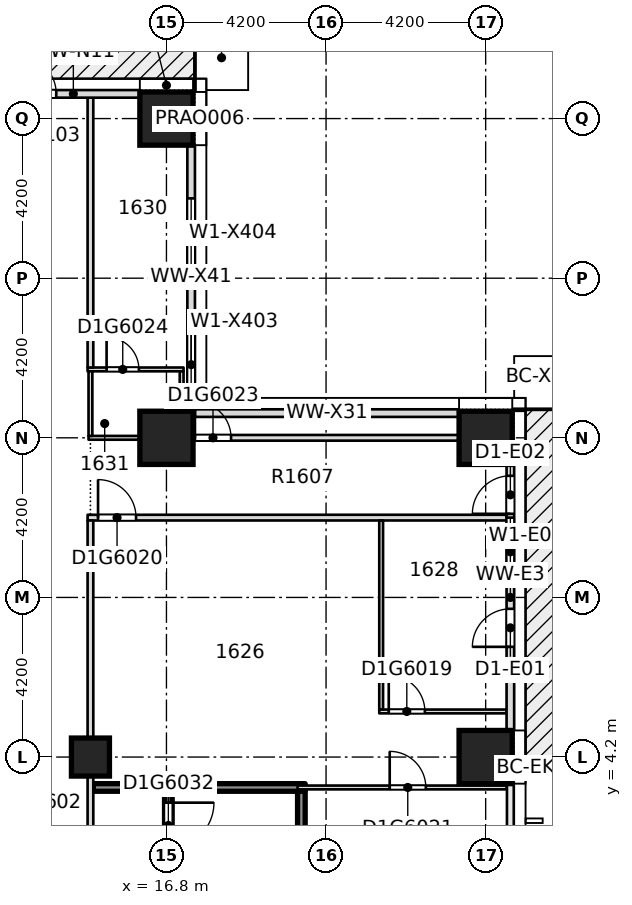
"""IFC4 building model, lengths in metres.
Left out: names, types, materials, properties, quantities, classifications, styles, units other than length and angle.
Written with IfcOpenShell. Run it as: python <this file> out.ifc"""

import sys

from ifc_helpers import new_model, si_unit, direction, frame, frame_2d, origin, origin_2d, place, context, subcontext, project, spatial, rectangle, extrude, element, fill, save


model = new_model("IFC4")
c1 = context("Model", 3, precision=1e-05, world=origin(), true_north=direction((0.0, 1.0)))
c2 = subcontext(c1, "Body", "Model", "MODEL_VIEW")
j1 = project(units=[si_unit("LENGTHUNIT", "METRE"), si_unit("PLANEANGLEUNIT", "RADIAN")], contexts=[c1])
p1 = place(None, origin())
s1 = spatial("IfcSite", under=j1, at=p1, CompositionType="ELEMENT")
p2 = place(p1, origin())
s2 = spatial("IfcBuilding", under=s1, at=p2, CompositionType="ELEMENT")
p3 = place(p2, frame((0.0, 0.0, 69.0)))
s3 = spatial("IfcBuildingStorey", under=s2, at=p3, CompositionType="ELEMENT", Elevation=69.0)
for number, where, z_axis, x_axis in (
    (1, (25.2, 4.2, -0.32), (0.0, 0.0, 1.0), (1.0, 0.0, 0.0)),
    (2, (16.8, 12.6, -0.32), (0.0, 0.0, 1.0), (1.0, 0.0, 0.0)),
    (3, (25.2, 12.6, -0.32), (0.0, 0.0, 1.0), (1.0, 0.0, 0.0)),
    (4, (16.8, 21.0, -0.32), (0.0, 0.0, 1.0), (1.0, 0.0, 0.0)),
):
    element("IfcColumn", number, at=place(p3, frame(where, z_axis=z_axis, x_axis=x_axis)), inside=s3, PredefinedType="COLUMN", context=c2, shape_type="SweptSolid", body=[
        extrude(rectangle(XDim=1.4, YDim=1.4, at=origin_2d()), origin(), (0.0, 0.0, 1.0), 3.45),
    ])
p4 = place(p3, frame((14.8, 4.2, -0.32), z_axis=(0.0, 0.0, 1.0), x_axis=(1.0, 0.0, 0.0)))
e5 = element("IfcColumn", 5, at=p4, inside=s3, PredefinedType="COLUMN", context=c2, shape_type="SweptSolid", body=[
    extrude(rectangle(XDim=1.0, YDim=1.0, at=origin_2d()), origin(), (0.0, 0.0, 1.0), 3.45),
])
p5 = place(p3, frame((14.875, 3.4, 0.0), z_axis=(0.0, 0.0, 1.0), x_axis=(1.0, 0.0, 0.0)))
e6 = element("IfcWall", 6, at=p5, inside=s3, PredefinedType="SOLIDWALL", context=c2, shape_type="SweptSolid", body=[
    extrude(rectangle(XDim=5.575, YDim=0.2, at=frame_2d((2.788, 0.0))), origin(), (0.0, 0.0, 1.0), 3.13),
])
p6 = place(p3, frame((20.25, 3.4, 0.0), z_axis=(0.0, 0.0, 1.0), x_axis=(1.0, 0.0, 0.0)))
e7 = element("IfcWall", 7, at=p6, inside=s3, PredefinedType="PARTITIONING", context=c2, shape_type="SweptSolid", body=[
    extrude(rectangle(XDim=5.5, YDim=0.1, at=frame_2d((2.75, 0.0))), origin(), (0.0, 0.0, 1.0), 3.13),
])
p7 = place(p6, frame((2.425, 0.0, 0.0)))
e8 = element("IfcOpeningElement", 8, at=p7, cuts=e7, PredefinedType="OPENING", context=c2, shape_type="SweptSolid", body=[
    extrude(rectangle(XDim=0.95, YDim=2.1, at=frame_2d((0.475, 1.05))), frame((0.0, 0.06, 0.0), z_axis=(0.0, -1.0, 0.0), x_axis=(1.0, 0.0, 0.0)), (0.0, 0.0, 1.0), 0.12),
])
p8 = place(p3, frame((22.4, 5.4, 0.0), z_axis=(0.0, 0.0, 1.0), x_axis=(1.0, 0.0, 0.0)))
e9 = element("IfcWall", 9, at=p8, inside=s3, PredefinedType="PARTITIONING", context=c2, shape_type="SweptSolid", body=[
    extrude(rectangle(XDim=3.35, YDim=0.1, at=frame_2d((1.675, 0.0))), origin(), (0.0, 0.0, 1.0), 3.13),
])
p9 = place(p8, frame((0.25, 0.0, 0.0)))
e10 = element("IfcOpeningElement", 10, at=p9, cuts=e9, PredefinedType="OPENING", context=c2, shape_type="SweptSolid", body=[
    extrude(rectangle(XDim=0.95, YDim=2.1, at=frame_2d((0.475, 1.05))), frame((0.0, 0.06, 0.0), z_axis=(0.0, -1.0, 0.0), x_axis=(1.0, 0.0, 0.0)), (0.0, 0.0, 1.0), 0.12),
])
p10 = place(p3, frame((14.725, 10.5, 0.0), z_axis=(0.0, 0.0, 1.0), x_axis=(1.0, 0.0, 0.0)))
e11 = element("IfcWall", 11, at=p10, inside=s3, PredefinedType="PARTITIONING", context=c2, shape_type="SweptSolid", body=[
    extrude(rectangle(XDim=11.025, YDim=0.15, at=frame_2d((5.512, 0.0))), origin(), (0.0, 0.0, 1.0), 3.13),
])
p11 = place(p10, frame((0.275, 0.0, 0.0)))
e12 = element("IfcOpeningElement", 12, at=p11, cuts=e11, PredefinedType="OPENING", context=c2, shape_type="SweptSolid", body=[
    extrude(rectangle(XDim=1.0, YDim=2.1, at=frame_2d((0.5, 1.05))), frame((0.0, 0.085, 0.0), z_axis=(0.0, -1.0, 0.0), x_axis=(1.0, 0.0, 0.0)), (0.0, 0.0, 1.0), 0.17),
])
p12 = place(p3, frame((14.75, 12.6, 0.0), z_axis=(0.0, 0.0, 1.0), x_axis=(1.0, 0.0, 0.0)))
e13 = element("IfcWall", 13, at=p12, inside=s3, PredefinedType="PARTITIONING", context=c2, shape_type="SweptSolid", body=[
    extrude(rectangle(XDim=2.5, YDim=0.1, at=frame_2d((1.25, 0.0))), origin(), (0.0, 0.0, 1.0), 3.13),
])
p13 = place(p3, frame((17.15, 12.6, 0.0), z_axis=(0.0, 0.0, 1.0), x_axis=(1.0, 0.0, 0.0)))
e14 = element("IfcWall", 14, at=p13, inside=s3, PredefinedType="PARTITIONING", context=c2, shape_type="SweptSolid", body=[
    extrude(rectangle(XDim=0.25, YDim=0.15, at=frame_2d((0.125, 0.0))), origin(), (0.0, 0.0, 1.0), 3.13),
])
p14 = place(p3, frame((14.725, 14.4, 0.0), z_axis=(0.0, 0.0, 1.0), x_axis=(1.0, 0.0, 0.0)))
e15 = element("IfcWall", 15, at=p14, inside=s3, PredefinedType="PARTITIONING", context=c2, shape_type="SweptSolid", body=[
    extrude(rectangle(XDim=2.525, YDim=0.1, at=frame_2d((1.262, 0.0))), origin(), (0.0, 0.0, 1.0), 3.13),
])
p15 = place(p14, frame((0.5, 0.0, 0.0)))
e16 = element("IfcOpeningElement", 16, at=p15, cuts=e15, PredefinedType="OPENING", context=c2, shape_type="SweptSolid", body=[
    extrude(rectangle(XDim=0.85, YDim=2.1, at=frame_2d((0.425, 1.05))), frame((0.0, 0.06, 0.0), z_axis=(0.0, -1.0, 0.0), x_axis=(1.0, 0.0, 0.0)), (0.0, 0.0, 1.0), 0.12),
])
p16 = place(p3, frame((14.8, -3.35, 0.0), z_axis=(0.0, 0.0, 1.0), x_axis=(0.0, 1.0, 0.0)))
e17 = element("IfcWall", 17, at=p16, inside=s3, PredefinedType="PARTITIONING", context=c2, shape_type="SweptSolid", body=[
    extrude(rectangle(XDim=13.775, YDim=0.15, at=frame_2d((6.888, 0.0))), origin(), (0.0, 0.0, 1.0), 3.13),
])
p17 = place(p16, frame((2.8, 0.0, 0.0)))
e18 = element("IfcOpeningElement", 18, at=p17, cuts=e17, PredefinedType="OPENING", context=c2, shape_type="SweptSolid", body=[
    extrude(rectangle(XDim=1.1, YDim=2.1, at=frame_2d((0.55, 1.05))), frame((0.0, 0.085, 0.0), z_axis=(0.0, -1.0, 0.0), x_axis=(1.0, 0.0, 0.0)), (0.0, 0.0, 1.0), 0.17),
])
p18 = place(p3, frame((14.8, 12.65, 0.0), z_axis=(0.0, 0.0, 1.0), x_axis=(0.0, 1.0, 0.0)))
e19 = element("IfcWall", 19, at=p18, inside=s3, PredefinedType="PARTITIONING", context=c2, shape_type="SweptSolid", body=[
    extrude(rectangle(XDim=1.7, YDim=0.1, at=frame_2d((0.85, 0.0))), origin(), (0.0, 0.0, 1.0), 3.13),
])
p19 = place(p3, frame((14.8, 14.45, 0.0), z_axis=(0.0, 0.0, 1.0), x_axis=(0.0, 1.0, 0.0)))
e20 = element("IfcWall", 20, at=p19, inside=s3, PredefinedType="PARTITIONING", context=c2, shape_type="SweptSolid", body=[
    extrude(rectangle(XDim=7.1, YDim=0.15, at=frame_2d((3.55, 0.0))), origin(), (0.0, 0.0, 1.0), 3.13),
])
p20 = place(p3, frame((16.85, -3.35, 0.0), z_axis=(0.0, 0.0, 1.0), x_axis=(0.0, 1.0, 0.0)))
e21 = element("IfcWall", 21, at=p20, inside=s3, PredefinedType="SOLIDWALL", context=c2, shape_type="SweptSolid", body=[
    extrude(rectangle(XDim=6.65, YDim=0.2, at=frame_2d((3.325, 0.0))), origin(), (0.0, 0.0, 1.0), 3.13),
])
p21 = place(p20, frame((5.15, 0.0, 0.0)))
e22 = element("IfcOpeningElement", 22, at=p21, cuts=e21, PredefinedType="OPENING", context=c2, shape_type="SweptSolid", body=[
    extrude(rectangle(XDim=1.2, YDim=2.1, at=frame_2d((0.6, 1.05))), frame((0.0, 0.11, 0.0), z_axis=(0.0, -1.0, 0.0), x_axis=(1.0, 0.0, 0.0)), (0.0, 0.0, 1.0), 0.22),
])
p22 = place(p3, frame((17.2, 12.675, 0.0), z_axis=(0.0, 0.0, 1.0), x_axis=(0.0, 1.0, 0.0)))
e23 = element("IfcWall", 23, at=p22, inside=s3, PredefinedType="PARTITIONING", context=c2, shape_type="SweptSolid", body=[
    extrude(rectangle(XDim=1.675, YDim=0.1, at=frame_2d((0.837, 0.0))), origin(), (0.0, 0.0, 1.0), 3.13),
])
p23 = place(p3, frame((20.35, -0.83, 0.0), z_axis=(0.0, 0.0, 1.0), x_axis=(0.0, 1.0, 0.0)))
e24 = element("IfcWall", 24, at=p23, inside=s3, PredefinedType="SOLIDWALL", context=c2, shape_type="SweptSolid", body=[
    extrude(rectangle(XDim=4.13, YDim=0.2, at=frame_2d((2.065, 0.0))), origin(), (0.0, 0.0, 1.0), 3.13),
])
p24 = place(p3, frame((22.45, 5.45, 0.0), z_axis=(0.0, 0.0, 1.0), x_axis=(0.0, 1.0, 0.0)))
e25 = element("IfcWall", 25, at=p24, inside=s3, PredefinedType="PARTITIONING", context=c2, shape_type="SweptSolid", body=[
    extrude(rectangle(XDim=4.975, YDim=0.1, at=frame_2d((2.488, 0.0))), origin(), (0.0, 0.0, 1.0), 3.13),
])
p25 = place(p3, frame((25.85, 4.9, 0.0), z_axis=(0.0, 0.0, 1.0), x_axis=(0.0, 1.0, 0.0)))
e26 = element("IfcWall", 26, at=p25, inside=s3, PredefinedType="STANDARD", context=c2, shape_type="SweptSolid", body=[
    extrude(rectangle(XDim=7.0, YDim=0.2, at=frame_2d((3.5, 0.0))), origin(), (0.0, 0.0, 1.0), 3.13),
])
p26 = place(p25, frame((2.2, 0.0, 0.0)))
e27 = element("IfcOpeningElement", 27, at=p26, cuts=e26, PredefinedType="OPENING", context=c2, shape_type="SweptSolid", body=[
    extrude(rectangle(XDim=1.0, YDim=2.4, at=frame_2d((0.5, 1.2))), frame((0.0, 0.11, 0.0), z_axis=(0.0, -1.0, 0.0), x_axis=(1.0, 0.0, 0.0)), (0.0, 0.0, 1.0), 0.22),
])
p27 = place(p25, frame((3.8, 0.0, 0.2)))
e28 = element("IfcOpeningElement", 28, at=p27, cuts=e26, PredefinedType="OPENING", context=c2, shape_type="SweptSolid", body=[
    extrude(rectangle(XDim=1.8, YDim=2.65, at=frame_2d((0.9, 1.325))), frame((0.0, 0.11, 0.0), z_axis=(0.0, -1.0, 0.0), x_axis=(1.0, 0.0, 0.0)), (0.0, 0.0, 1.0), 0.22),
])
p28 = place(p25, frame((5.7, 0.0, 0.0)))
e29 = element("IfcOpeningElement", 29, at=p28, cuts=e26, PredefinedType="OPENING", context=c2, shape_type="SweptSolid", body=[
    extrude(rectangle(XDim=1.0, YDim=2.4, at=frame_2d((0.5, 1.2))), frame((0.0, 0.11, 0.0), z_axis=(0.0, -1.0, 0.0), x_axis=(1.0, 0.0, 0.0)), (0.0, 0.0, 1.0), 0.22),
])
p29 = place(p3, frame((24.5, 13.25, 0.0), z_axis=(0.0, 0.0, 1.0), x_axis=(-1.0, 0.0, 0.0)))
e30 = element("IfcWall", 30, at=p29, inside=s3, PredefinedType="STANDARD", context=c2, shape_type="SweptSolid", body=[
    extrude(rectangle(XDim=6.95, YDim=0.2, at=frame_2d((3.475, 0.0))), origin(), (0.0, 0.0, 1.0), 3.13),
])
p30 = place(p3, frame((17.45, 13.35, 0.0), z_axis=(0.0, 0.0, 1.0), x_axis=(0.0, 1.0, 0.0)))
e31 = element("IfcWall", 31, at=p30, inside=s3, PredefinedType="STANDARD", context=c2, shape_type="SweptSolid", body=[
    extrude(rectangle(XDim=6.95, YDim=0.2, at=frame_2d((3.475, 0.0))), origin(), (0.0, 0.0, 1.0), 3.13),
])
p31 = place(p30, frame((0.275, 0.0, 0.2)))
e32 = element("IfcOpeningElement", 32, at=p31, cuts=e31, PredefinedType="OPENING", context=c2, shape_type="SweptSolid", body=[
    extrude(rectangle(XDim=1.8, YDim=2.65, at=frame_2d((0.9, 1.325))), frame((0.0, 0.11, 0.0), z_axis=(0.0, -1.0, 0.0), x_axis=(1.0, 0.0, 0.0)), (0.0, 0.0, 1.0), 0.22),
])
p32 = place(p30, frame((3.75, 0.0, 0.2)))
e33 = element("IfcOpeningElement", 33, at=p32, cuts=e31, PredefinedType="OPENING", context=c2, shape_type="SweptSolid", body=[
    extrude(rectangle(XDim=1.8, YDim=2.65, at=frame_2d((0.9, 1.325))), frame((0.0, 0.11, 0.0), z_axis=(0.0, -1.0, 0.0), x_axis=(1.0, 0.0, 0.0)), (0.0, 0.0, 1.0), 0.22),
])
p33 = place(p3, frame((16.1, 21.65, 0.0), z_axis=(0.0, 0.0, 1.0), x_axis=(-1.0, 0.0, 0.0)))
e34 = element("IfcWall", 34, at=p33, inside=s3, PredefinedType="STANDARD", context=c2, shape_type="SweptSolid", body=[
    extrude(rectangle(XDim=3.5, YDim=0.2, at=frame_2d((1.75, 0.0))), origin(), (0.0, 0.0, 1.0), 3.13),
])
p34 = place(p33, frame((2.2, 0.0, 0.0)))
e35 = element("IfcOpeningElement", 35, at=p34, cuts=e34, PredefinedType="OPENING", context=c2, shape_type="SweptSolid", body=[
    extrude(rectangle(XDim=1.0, YDim=2.4, at=frame_2d((0.5, 1.2))), frame((0.0, 0.11, 0.0), z_axis=(0.0, -1.0, 0.0), x_axis=(1.0, 0.0, 0.0)), (0.0, 0.0, 1.0), 0.22),
])
p35 = place(p3, frame((17.4, 12.6, 0.0), z_axis=(0.0, 0.0, 1.0), x_axis=(1.0, 0.0, 0.0)))
e36 = element("IfcWall", 36, at=p35, inside=s3, PredefinedType="PARTITIONING", context=c2, shape_type="SweptSolid", body=[
    extrude(rectangle(XDim=7.1, YDim=0.15, at=frame_2d((3.55, 0.0))), origin(), (0.0, 0.0, 1.0), 2.58),
])
p36 = place(p35, frame((0.15, 0.0, 0.0)))
e37 = element("IfcOpeningElement", 37, at=p36, cuts=e36, PredefinedType="OPENING", context=c2, shape_type="SweptSolid", body=[
    extrude(rectangle(XDim=0.95, YDim=2.1, at=frame_2d((0.475, 1.05))), frame((0.0, 0.085, 0.0), z_axis=(0.0, -1.0, 0.0), x_axis=(1.0, 0.0, 0.0)), (0.0, 0.0, 1.0), 0.17),
])
p37 = place(p3, frame((24.5, 12.6, 0.0), z_axis=(0.0, 0.0, 1.0), x_axis=(1.0, 0.0, 0.0)))
e38 = element("IfcWall", 38, at=p37, inside=s3, PredefinedType="PARTITIONING", context=c2, shape_type="SweptSolid", body=[
    extrude(rectangle(XDim=1.25, YDim=0.15, at=frame_2d((0.625, 0.0))), origin(), (0.0, 0.0, 1.0), 3.13),
])
p38 = place(p9, origin())
e39 = element("IfcDoor", 39, at=p38, inside=s3, OperationType="SINGLE_SWING_LEFT", PredefinedType="DOOR", context=c2, shape_type="SweptSolid", body=[
    extrude(rectangle(XDim=0.95, YDim=2.1, at=frame_2d((0.475, 1.05))), frame((0.0, 0.025, 0.0), z_axis=(0.0, -1.0, 0.0), x_axis=(1.0, 0.0, 0.0)), (0.0, 0.0, 1.0), 0.05),
])
fill(e10, e39)
p39 = place(p11, origin())
e40 = element("IfcDoor", 40, at=p39, inside=s3, OperationType="SINGLE_SWING_RIGHT", PredefinedType="DOOR", context=c2, shape_type="SweptSolid", body=[
    extrude(rectangle(XDim=1.0, YDim=2.1, at=frame_2d((0.5, 1.05))), frame((0.0, 0.025, 0.0), z_axis=(0.0, -1.0, 0.0), x_axis=(1.0, 0.0, 0.0)), (0.0, 0.0, 1.0), 0.05),
])
fill(e12, e40)
p40 = place(p7, origin())
e41 = element("IfcDoor", 41, at=p40, inside=s3, OperationType="SINGLE_SWING_LEFT", PredefinedType="DOOR", context=c2, shape_type="SweptSolid", body=[
    extrude(rectangle(XDim=0.95, YDim=2.1, at=frame_2d((0.475, 1.05))), frame((0.0, 0.025, 0.0), z_axis=(0.0, -1.0, 0.0), x_axis=(1.0, 0.0, 0.0)), (0.0, 0.0, 1.0), 0.05),
])
fill(e8, e41)
p41 = place(p36, origin())
e42 = element("IfcDoor", 42, at=p41, inside=s3, OperationType="SINGLE_SWING_LEFT", PredefinedType="DOOR", context=c2, shape_type="SweptSolid", body=[
    extrude(rectangle(XDim=0.95, YDim=2.1, at=frame_2d((0.475, 1.05))), frame((0.0, 0.025, 0.0), z_axis=(0.0, -1.0, 0.0), x_axis=(1.0, 0.0, 0.0)), (0.0, 0.0, 1.0), 0.05),
])
fill(e37, e42)
p42 = place(p15, origin())
e43 = element("IfcDoor", 43, at=p42, inside=s3, OperationType="SINGLE_SWING_RIGHT", PredefinedType="DOOR", context=c2, shape_type="SweptSolid", body=[
    extrude(rectangle(XDim=0.85, YDim=2.1, at=frame_2d((0.425, 1.05))), frame((0.0, 0.025, 0.0), z_axis=(0.0, -1.0, 0.0), x_axis=(1.0, 0.0, 0.0)), (0.0, 0.0, 1.0), 0.05),
])
fill(e16, e43)
p43 = place(p21, origin())
e44 = element("IfcDoor", 44, at=p43, inside=s3, OperationType="SINGLE_SWING_LEFT", PredefinedType="DOOR", context=c2, shape_type="SweptSolid", body=[
    extrude(rectangle(XDim=1.2, YDim=2.1, at=frame_2d((0.6, 1.05))), frame((0.0, 0.025, 0.0), z_axis=(0.0, -1.0, 0.0), x_axis=(1.0, 0.0, 0.0)), (0.0, 0.0, 1.0), 0.05),
])
fill(e22, e44)
p44 = place(p26, origin())
e45 = element("IfcDoor", 45, at=p44, inside=s3, OperationType="SINGLE_SWING_LEFT", PredefinedType="DOOR", context=c2, shape_type="SweptSolid", body=[
    extrude(rectangle(XDim=1.0, YDim=2.4, at=frame_2d((0.5, 1.2))), frame((0.0, 0.025, 0.0), z_axis=(0.0, -1.0, 0.0), x_axis=(1.0, 0.0, 0.0)), (0.0, 0.0, 1.0), 0.05),
])
fill(e27, e45)
p45 = place(p27, origin())
e46 = element("IfcWindow", 46, at=p45, inside=s3, PartitioningType="SINGLE_PANEL", PredefinedType="WINDOW", context=c2, shape_type="SweptSolid", body=[
    extrude(rectangle(XDim=1.8, YDim=2.65, at=frame_2d((0.9, 1.325))), frame((0.0, 0.03, 0.0), z_axis=(0.0, -1.0, 0.0), x_axis=(1.0, 0.0, 0.0)), (0.0, 0.0, 1.0), 0.06),
])
fill(e28, e46)
p46 = place(p28, origin())
e47 = element("IfcDoor", 47, at=p46, inside=s3, OperationType="SINGLE_SWING_LEFT", PredefinedType="DOOR", context=c2, shape_type="SweptSolid", body=[
    extrude(rectangle(XDim=1.0, YDim=2.4, at=frame_2d((0.5, 1.2))), frame((0.0, 0.025, 0.0), z_axis=(0.0, -1.0, 0.0), x_axis=(1.0, 0.0, 0.0)), (0.0, 0.0, 1.0), 0.05),
])
fill(e29, e47)
p47 = place(p31, origin())
e48 = element("IfcWindow", 48, at=p47, inside=s3, PartitioningType="SINGLE_PANEL", PredefinedType="WINDOW", context=c2, shape_type="SweptSolid", body=[
    extrude(rectangle(XDim=1.8, YDim=2.65, at=frame_2d((0.9, 1.325))), frame((0.0, 0.03, 0.0), z_axis=(0.0, -1.0, 0.0), x_axis=(1.0, 0.0, 0.0)), (0.0, 0.0, 1.0), 0.06),
])
fill(e32, e48)
p48 = place(p32, origin())
e49 = element("IfcWindow", 49, at=p48, inside=s3, PartitioningType="SINGLE_PANEL", PredefinedType="WINDOW", context=c2, shape_type="SweptSolid", body=[
    extrude(rectangle(XDim=1.8, YDim=2.65, at=frame_2d((0.9, 1.325))), frame((0.0, 0.03, 0.0), z_axis=(0.0, -1.0, 0.0), x_axis=(1.0, 0.0, 0.0)), (0.0, 0.0, 1.0), 0.06),
])
fill(e33, e49)
p49 = place(p34, origin())
e50 = element("IfcDoor", 50, at=p49, inside=s3, OperationType="SINGLE_SWING_LEFT", PredefinedType="DOOR", context=c2, shape_type="SweptSolid", body=[
    extrude(rectangle(XDim=1.0, YDim=2.4, at=frame_2d((0.5, 1.2))), frame((0.0, 0.025, 0.0), z_axis=(0.0, -1.0, 0.0), x_axis=(1.0, 0.0, 0.0)), (0.0, 0.0, 1.0), 0.05),
])
fill(e35, e50)
save(model, sys.argv[1])
